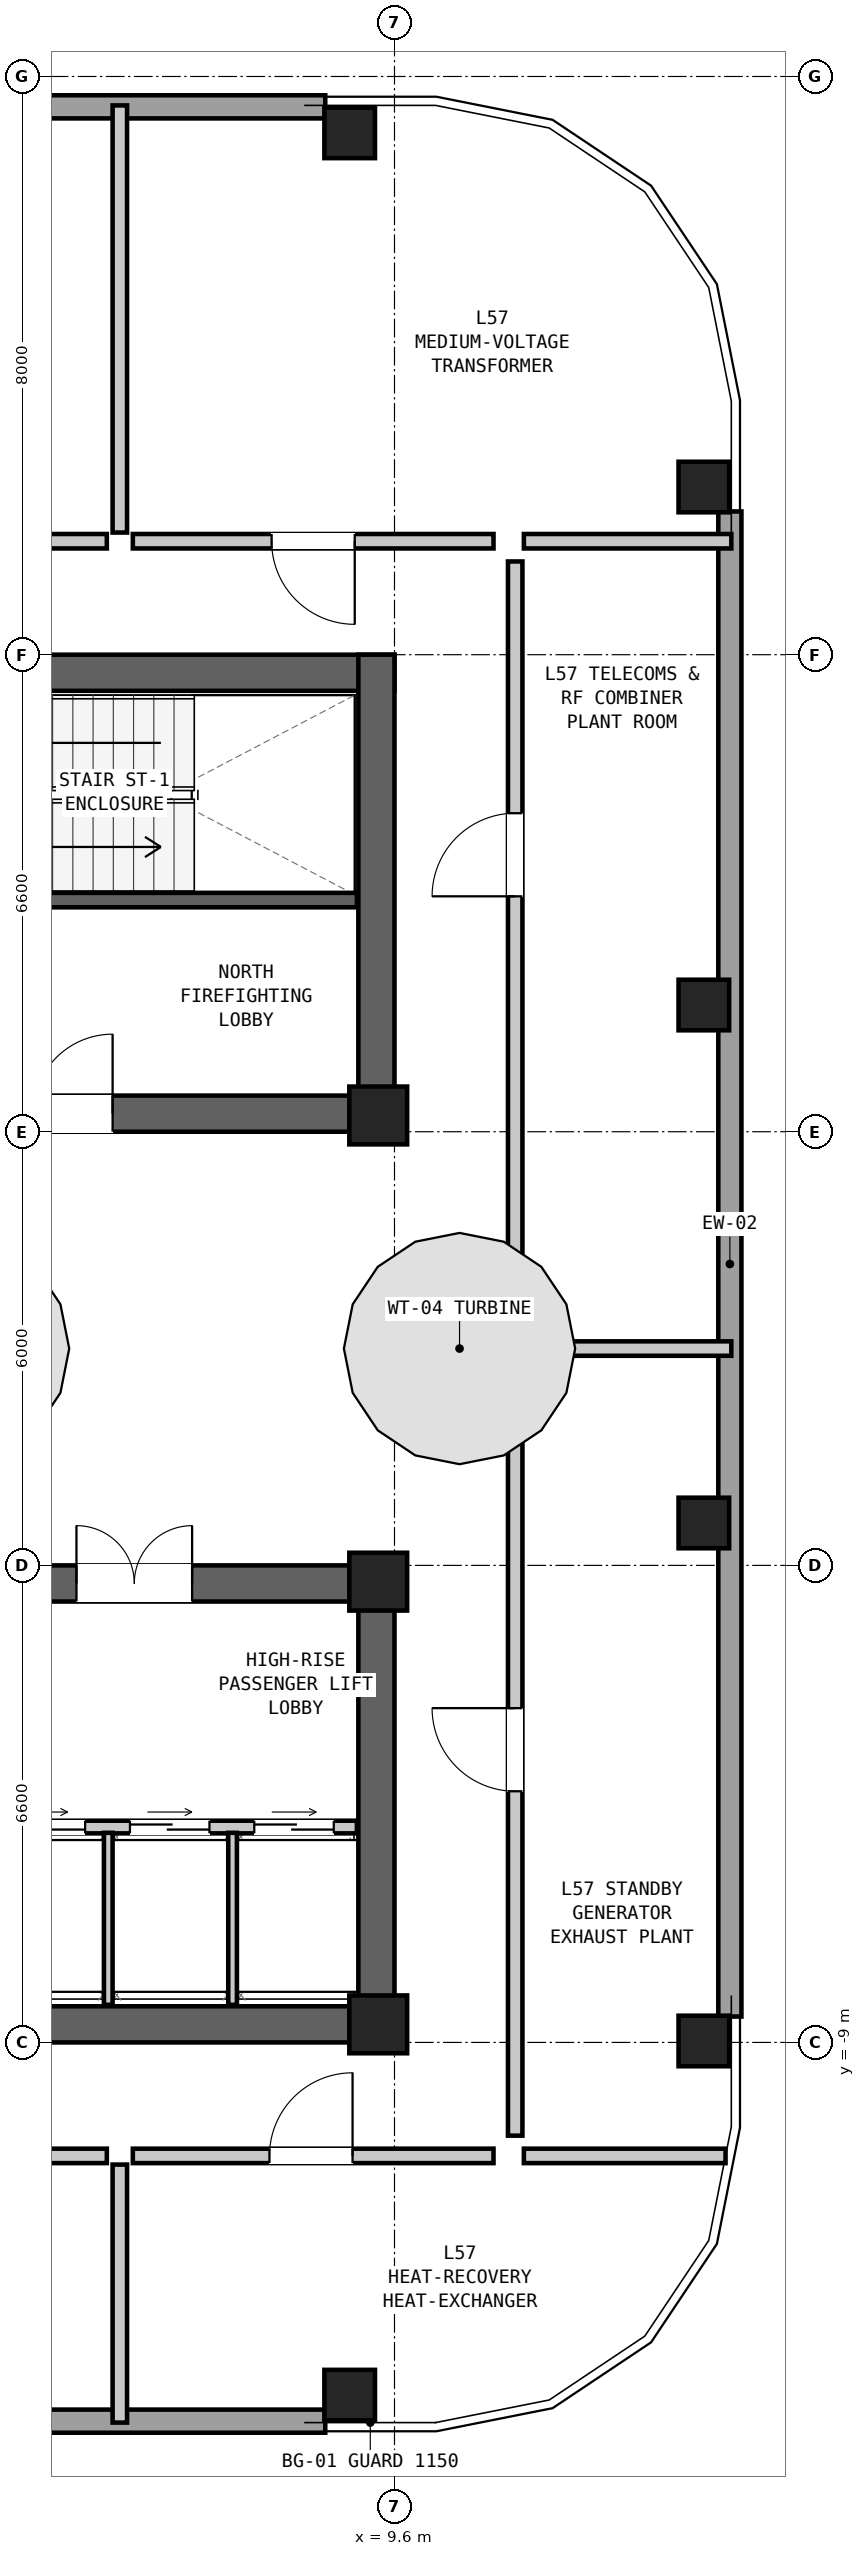
"""IFC4 building model, lengths in metres.
Left out: names, types, materials, properties, quantities, classifications, styles, units other than length and angle.
Written with IfcOpenShell. Run it as: python <this file> out.ifc"""

import sys

from ifc_helpers import new_model, si_unit, direction, frame, frame_2d, origin, origin_2d, place, context, subcontext, project, spatial, rectangle, hollow_rectangle, extrude, element, fill, save


model = new_model("IFC4")
c1 = context("Model", 3, precision=1e-05, world=origin(), true_north=direction((0.0, 1.0)))
c2 = subcontext(c1, "Body", "Model", "MODEL_VIEW")
j1 = project(units=[si_unit("LENGTHUNIT", "METRE"), si_unit("PLANEANGLEUNIT", "RADIAN")], contexts=[c1])
p1 = place(None, origin())
s1 = spatial("IfcSite", under=j1, at=p1, CompositionType="ELEMENT")
p2 = place(p1, origin())
s2 = spatial("IfcBuilding", under=s1, at=p2, CompositionType="ELEMENT")
p3 = place(p2, frame((0.0, 0.0, 195.15)))
s3 = spatial("IfcBuildingStorey", under=s2, at=p3, CompositionType="ELEMENT", Elevation=195.15)
p4 = place(p3, frame((-9.6, 9.95, 0.0), z_axis=(0.0, 0.0, 1.0), x_axis=(1.0, 0.0, 0.0)))
e1 = element("IfcWall", 1, at=p4, inside=s3, PredefinedType="SHEAR", context=c2, shape_type="SweptSolid", body=[
    extrude(rectangle(XDim=19.2, YDim=0.5, at=frame_2d((9.6, 0.0))), origin(), (0.0, 0.0, 1.0), 4.35),
])
p5 = place(p3, frame((-9.6, 3.85, 0.0), z_axis=(0.0, 0.0, 1.0), x_axis=(1.0, 0.0, 0.0)))
e2 = element("IfcWall", 2, at=p5, inside=s3, PredefinedType="SHEAR", context=c2, shape_type="SweptSolid", body=[
    extrude(rectangle(XDim=19.2, YDim=0.5, at=frame_2d((9.6, 0.0))), origin(), (0.0, 0.0, 1.0), 4.35),
])
p6 = place(p5, frame((14.2, 0.0, 0.0)))
e3 = element("IfcOpeningElement", 3, at=p6, cuts=e2, PredefinedType="OPENING", context=c2, shape_type="SweptSolid", body=[
    extrude(rectangle(XDim=1.1, YDim=2.08, at=frame_2d((0.55, 1.04))), frame((0.0, 0.262, 0.0), z_axis=(0.0, -1.0, 0.0), x_axis=(1.0, 0.0, 0.0)), (0.0, 0.0, 1.0), 0.524),
])
p7 = place(p5, frame((8.2, 0.0, 0.0)))
e4 = element("IfcOpeningElement", 4, at=p7, cuts=e2, PredefinedType="OPENING", context=c2, shape_type="SweptSolid", body=[
    extrude(rectangle(XDim=1.15, YDim=2.1, at=frame_2d((0.575, 1.05))), frame((0.0, 0.262, 0.0), z_axis=(0.0, -1.0, 0.0), x_axis=(1.0, 0.0, 0.0)), (0.0, 0.0, 1.0), 0.524),
])
p8 = place(p5, frame((2.5, 0.0, 0.0)))
e5 = element("IfcOpeningElement", 5, at=p8, cuts=e2, PredefinedType="OPENING", context=c2, shape_type="SweptSolid", body=[
    extrude(rectangle(XDim=1.6, YDim=2.12, at=frame_2d((0.8, 1.06))), frame((0.0, 0.262, 0.0), z_axis=(0.0, -1.0, 0.0), x_axis=(1.0, 0.0, 0.0)), (0.0, 0.0, 1.0), 0.524),
])
p9 = place(p3, frame((9.35, 3.6, 0.0), z_axis=(0.0, 0.0, 1.0), x_axis=(0.0, 1.0, 0.0)))
e6 = element("IfcWall", 6, at=p9, inside=s3, PredefinedType="SHEAR", context=c2, shape_type="SweptSolid", body=[
    extrude(rectangle(XDim=6.6, YDim=0.5, at=frame_2d((3.3, 0.0))), origin(), (0.0, 0.0, 1.0), 4.35),
])
p10 = place(p3, frame((-9.6, -8.75, 0.0), z_axis=(0.0, 0.0, 1.0), x_axis=(1.0, 0.0, 0.0)))
e7 = element("IfcWall", 7, at=p10, inside=s3, PredefinedType="SHEAR", context=c2, shape_type="SweptSolid", body=[
    extrude(rectangle(XDim=19.2, YDim=0.5, at=frame_2d((9.6, 0.0))), origin(), (0.0, 0.0, 1.0), 4.35),
])
p11 = place(p3, frame((-9.6, -2.65, 0.0), z_axis=(0.0, 0.0, 1.0), x_axis=(1.0, 0.0, 0.0)))
e8 = element("IfcWall", 8, at=p11, inside=s3, PredefinedType="SHEAR", context=c2, shape_type="SweptSolid", body=[
    extrude(rectangle(XDim=19.2, YDim=0.5, at=frame_2d((9.6, 0.0))), origin(), (0.0, 0.0, 1.0), 4.35),
])
p12 = place(p11, frame((3.8, 0.0, 0.0)))
e9 = element("IfcOpeningElement", 9, at=p12, cuts=e8, PredefinedType="OPENING", context=c2, shape_type="SweptSolid", body=[
    extrude(rectangle(XDim=1.1, YDim=2.08, at=frame_2d((0.55, 1.04))), frame((0.0, 0.262, 0.0), z_axis=(0.0, -1.0, 0.0), x_axis=(1.0, 0.0, 0.0)), (0.0, 0.0, 1.0), 0.524),
])
p13 = place(p11, frame((10.15, 0.0, 0.0)))
e10 = element("IfcOpeningElement", 10, at=p13, cuts=e8, PredefinedType="OPENING", context=c2, shape_type="SweptSolid", body=[
    extrude(rectangle(XDim=0.9, YDim=2.05, at=frame_2d((0.45, 1.025))), frame((0.0, 0.262, 0.0), z_axis=(0.0, -1.0, 0.0), x_axis=(1.0, 0.0, 0.0)), (0.0, 0.0, 1.0), 0.524),
])
p14 = place(p11, frame((12.1, 0.0, 0.0)))
e11 = element("IfcOpeningElement", 11, at=p14, cuts=e8, PredefinedType="OPENING", context=c2, shape_type="SweptSolid", body=[
    extrude(rectangle(XDim=0.95, YDim=2.1, at=frame_2d((0.475, 1.05))), frame((0.0, 0.262, 0.0), z_axis=(0.0, -1.0, 0.0), x_axis=(1.0, 0.0, 0.0)), (0.0, 0.0, 1.0), 0.524),
])
p15 = place(p11, frame((14.8, 0.0, 0.0)))
e12 = element("IfcOpeningElement", 12, at=p15, cuts=e8, PredefinedType="OPENING", context=c2, shape_type="SweptSolid", body=[
    extrude(rectangle(XDim=1.6, YDim=2.12, at=frame_2d((0.8, 1.06))), frame((0.0, 0.262, 0.0), z_axis=(0.0, -1.0, 0.0), x_axis=(1.0, 0.0, 0.0)), (0.0, 0.0, 1.0), 0.524),
])
p16 = place(p3, frame((9.35, -9.0, 0.0), z_axis=(0.0, 0.0, 1.0), x_axis=(0.0, 1.0, 0.0)))
e13 = element("IfcWall", 13, at=p16, inside=s3, PredefinedType="SHEAR", context=c2, shape_type="SweptSolid", body=[
    extrude(rectangle(XDim=6.6, YDim=0.5, at=frame_2d((3.3, 0.0))), origin(), (0.0, 0.0, 1.0), 4.35),
])
for number, where, z_axis, x_axis in (
    (14, (8.98, -13.88, 0.0), (0.0, 0.0, 1.0), (1.0, 0.0, 0.0)),
    (15, (13.88, -8.98, 0.0), (0.0, 0.0, 1.0), (0.0, 1.0, 0.0)),
    (16, (13.88, -1.813, 0.0), (0.0, 0.0, 1.0), (0.0, 1.0, 0.0)),
    (17, (13.88, 5.353, 0.0), (0.0, 0.0, 1.0), (0.0, 1.0, 0.0)),
    (18, (13.88, 12.52, 0.0), (0.0, 0.0, 1.0), (0.0, 1.0, 0.0)),
    (19, (8.98, 17.42, 0.0), (0.0, 0.0, 1.0), (1.0, 0.0, 0.0)),
):
    element("IfcColumn", number, at=place(p3, frame(where, z_axis=z_axis, x_axis=x_axis)), inside=s3, PredefinedType="COLUMN", context=c2, shape_type="SweptSolid", body=[
        extrude(hollow_rectangle(XDim=0.7, YDim=0.7, WallThickness=0.045, at=origin_2d()), origin(), (0.0, 0.0, 1.0), 4.35),
    ])
for number, where, z_axis, x_axis in (
    (20, (9.375, 3.825, 0.0), (0.0, 0.0, 1.0), (1.0, 0.0, 0.0)),
    (21, (9.375, -2.625, 0.0), (0.0, 0.0, 1.0), (1.0, 0.0, 0.0)),
    (22, (9.375, -8.75, 0.0), (0.0, 0.0, 1.0), (1.0, 0.0, 0.0)),
):
    element("IfcColumn", number, at=place(p3, frame(where, z_axis=z_axis, x_axis=x_axis)), inside=s3, PredefinedType="COLUMN", context=c2, shape_type="SweptSolid", body=[
        extrude(rectangle(XDim=0.8, YDim=0.8, at=origin_2d()), origin(), (0.0, 0.0, 1.0), 4.35),
    ])
for number, where, z_axis, x_axis in (
    (23, (8.642, -14.24, 0.0), (0.0, 0.0, 1.0), (-1.0, 0.0, 0.0)),
    (24, (14.24, 12.182, 0.0), (0.0, 0.0, 1.0), (0.0, -1.0, 0.0)),
    (25, (-12.182, 17.78, 0.0), (0.0, 0.0, 1.0), (1.0, 0.0, 0.0)),
):
    element("IfcWall", number, at=place(p3, frame(where, z_axis=z_axis, x_axis=x_axis)), inside=s3, PredefinedType="SOLIDWALL", context=c2, shape_type="SweptSolid", body=[
        extrude(rectangle(XDim=20.824, YDim=0.32, at=frame_2d((10.412, 0.0))), origin(), (0.0, 0.0, 1.0), 2.34),
    ])
p17 = place(p3, frame((2.36, 6.805, 0.0), z_axis=(0.0, 0.0, 1.0), x_axis=(1.0, 0.0, 0.0)))
e26 = element("IfcWall", 26, at=p17, inside=s3, PredefinedType="SHEAR", context=c2, shape_type="SweptSolid", body=[
    extrude(rectangle(XDim=6.72, YDim=0.2, at=frame_2d((3.36, 0.0))), origin(), (0.0, 0.0, 1.0), 4.16),
])
p18 = place(p17, frame((0.3, 0.0, 0.0)))
e27 = element("IfcOpeningElement", 27, at=p18, cuts=e26, PredefinedType="OPENING", context=c2, shape_type="SweptSolid", body=[
    extrude(rectangle(XDim=1.05, YDim=2.08, at=frame_2d((0.525, 1.04))), frame((0.0, 0.112, 0.0), z_axis=(0.0, -1.0, 0.0), x_axis=(1.0, 0.0, 0.0)), (0.0, 0.0, 1.0), 0.224),
])
p19 = place(p3, frame((4.0, -6.02, 0.0), z_axis=(0.0, 0.0, 1.0), x_axis=(1.0, 0.0, 0.0)))
e28 = element("IfcWall", 28, at=p19, inside=s3, PredefinedType="PARTITIONING", context=c2, shape_type="SweptSolid", body=[
    extrude(rectangle(XDim=5.08, YDim=0.175, at=frame_2d((2.54, 0.0))), origin(), (0.0, 0.0, 1.0), 4.16),
])
p20 = place(p19, frame((0.22, 0.0, 0.0)))
e29 = element("IfcOpeningElement", 29, at=p20, cuts=e28, PredefinedType="OPENING", context=c2, shape_type="SweptSolid", body=[
    extrude(rectangle(XDim=1.1, YDim=2.06, at=frame_2d((0.55, 1.03))), frame((0.0, 0.1, 0.0), z_axis=(0.0, -1.0, 0.0), x_axis=(1.0, 0.0, 0.0)), (0.0, 0.0, 1.0), 0.199),
])
p21 = place(p19, frame((1.94, 0.0, 0.0)))
e30 = element("IfcOpeningElement", 30, at=p21, cuts=e28, PredefinedType="OPENING", context=c2, shape_type="SweptSolid", body=[
    extrude(rectangle(XDim=1.1, YDim=2.06, at=frame_2d((0.55, 1.03))), frame((0.0, 0.1, 0.0), z_axis=(0.0, -1.0, 0.0), x_axis=(1.0, 0.0, 0.0)), (0.0, 0.0, 1.0), 0.199),
])
p22 = place(p19, frame((3.66, 0.0, 0.0)))
e31 = element("IfcOpeningElement", 31, at=p22, cuts=e28, PredefinedType="OPENING", context=c2, shape_type="SweptSolid", body=[
    extrude(rectangle(XDim=1.1, YDim=2.06, at=frame_2d((0.55, 1.03))), frame((0.0, 0.1, 0.0), z_axis=(0.0, -1.0, 0.0), x_axis=(1.0, 0.0, 0.0)), (0.0, 0.0, 1.0), 0.199),
])
for number, where, z_axis, x_axis in (
    (32, (5.64, -8.48, 0.0), (0.0, 0.0, 1.0), (0.0, 1.0, 0.0)),
    (33, (7.36, -8.48, 0.0), (0.0, 0.0, 1.0), (0.0, 1.0, 0.0)),
):
    element("IfcWall", number, at=place(p3, frame(where, z_axis=z_axis, x_axis=x_axis)), inside=s3, PredefinedType="PARTITIONING", context=c2, shape_type="SweptSolid", body=[
        extrude(rectangle(XDim=2.38, YDim=0.12, at=frame_2d((1.19, 0.0))), origin(), (0.0, 0.0, 1.0), 4.16),
    ])
p23 = place(p3, frame((5.62, 11.77, 0.0), z_axis=(0.0, 0.0, 1.0), x_axis=(-1.0, 0.0, 0.0)))
e34 = element("IfcWall", 34, at=p23, inside=s3, PredefinedType="PARTITIONING", context=c2, shape_type="SweptSolid", body=[
    extrude(rectangle(XDim=5.09, YDim=0.2, at=frame_2d((2.545, 0.0))), origin(), (0.0, 0.0, 1.0), 4.16),
])
p24 = place(p23, frame((1.97, 0.0, 0.0)))
e35 = element("IfcOpeningElement", 35, at=p24, cuts=e34, PredefinedType="OPENING", context=c2, shape_type="SweptSolid", body=[
    extrude(rectangle(XDim=1.15, YDim=2.1, at=frame_2d((0.575, 1.05))), frame((0.0, 0.112, 0.0), z_axis=(0.0, -1.0, 0.0), x_axis=(1.0, 0.0, 0.0)), (0.0, 0.0, 1.0), 0.224),
])
p25 = place(p3, frame((5.8, 11.89, 0.0), z_axis=(0.0, 0.0, 1.0), x_axis=(0.0, 1.0, 0.0)))
e36 = element("IfcWall", 36, at=p25, inside=s3, PredefinedType="PARTITIONING", context=c2, shape_type="SweptSolid", body=[
    extrude(rectangle(XDim=5.91, YDim=0.2, at=frame_2d((2.955, 0.0))), origin(), (0.0, 0.0, 1.0), 3.681),
])
p26 = place(p3, frame((10.97, 11.77, 0.0), z_axis=(0.0, 0.0, 1.0), x_axis=(-1.0, 0.0, 0.0)))
e37 = element("IfcWall", 37, at=p26, inside=s3, PredefinedType="PARTITIONING", context=c2, shape_type="SweptSolid", body=[
    extrude(rectangle(XDim=4.99, YDim=0.2, at=frame_2d((2.495, 0.0))), origin(), (0.0, 0.0, 1.0), 2.34),
])
p27 = place(p26, frame((1.92, 0.0, 0.0)))
e38 = element("IfcOpeningElement", 38, at=p27, cuts=e37, PredefinedType="OPENING", context=c2, shape_type="SweptSolid", body=[
    extrude(rectangle(XDim=1.15, YDim=2.1, at=frame_2d((0.575, 1.05))), frame((0.0, 0.112, 0.0), z_axis=(0.0, -1.0, 0.0), x_axis=(1.0, 0.0, 0.0)), (0.0, 0.0, 1.0), 0.224),
])
p28 = place(p3, frame((0.53, -10.57, 0.0), z_axis=(0.0, 0.0, 1.0), x_axis=(1.0, 0.0, 0.0)))
e39 = element("IfcWall", 39, at=p28, inside=s3, PredefinedType="PARTITIONING", context=c2, shape_type="SweptSolid", body=[
    extrude(rectangle(XDim=5.09, YDim=0.2, at=frame_2d((2.545, 0.0))), origin(), (0.0, 0.0, 1.0), 4.16),
])
p29 = place(p28, frame((1.97, 0.0, 0.0)))
e40 = element("IfcOpeningElement", 40, at=p29, cuts=e39, PredefinedType="OPENING", context=c2, shape_type="SweptSolid", body=[
    extrude(rectangle(XDim=1.15, YDim=2.1, at=frame_2d((0.575, 1.05))), frame((0.0, 0.112, 0.0), z_axis=(0.0, -1.0, 0.0), x_axis=(1.0, 0.0, 0.0)), (0.0, 0.0, 1.0), 0.224),
])
p30 = place(p3, frame((5.8, -14.26, 0.0), z_axis=(0.0, 0.0, 1.0), x_axis=(0.0, 1.0, 0.0)))
e41 = element("IfcWall", 41, at=p30, inside=s3, PredefinedType="PARTITIONING", context=c2, shape_type="SweptSolid", body=[
    extrude(rectangle(XDim=3.57, YDim=0.2, at=frame_2d((1.785, 0.0))), origin(), (0.0, 0.0, 1.0), 3.681),
])
p31 = place(p3, frame((5.98, -10.57, 0.0), z_axis=(0.0, 0.0, 1.0), x_axis=(1.0, 0.0, 0.0)))
e42 = element("IfcWall", 42, at=p31, inside=s3, PredefinedType="PARTITIONING", context=c2, shape_type="SweptSolid", body=[
    extrude(rectangle(XDim=4.99, YDim=0.2, at=frame_2d((2.495, 0.0))), origin(), (0.0, 0.0, 1.0), 4.16),
])
p32 = place(p31, frame((1.89, 0.0, 0.0)))
e43 = element("IfcOpeningElement", 43, at=p32, cuts=e42, PredefinedType="OPENING", context=c2, shape_type="SweptSolid", body=[
    extrude(rectangle(XDim=1.15, YDim=2.1, at=frame_2d((0.575, 1.05))), frame((0.0, 0.112, 0.0), z_axis=(0.0, -1.0, 0.0), x_axis=(1.0, 0.0, 0.0)), (0.0, 0.0, 1.0), 0.224),
])
p33 = place(p3, frame((11.39, 11.77, 0.0), z_axis=(0.0, 0.0, 1.0), x_axis=(1.0, 0.0, 0.0)))
e44 = element("IfcWall", 44, at=p33, inside=s3, PredefinedType="PARTITIONING", context=c2, shape_type="SweptSolid", body=[
    extrude(rectangle(XDim=2.87, YDim=0.2, at=frame_2d((1.435, 0.0))), origin(), (0.0, 0.0, 1.0), 2.34),
])
p34 = place(p3, frame((11.39, -10.57, 0.0), z_axis=(0.0, 0.0, 1.0), x_axis=(1.0, 0.0, 0.0)))
e45 = element("IfcWall", 45, at=p34, inside=s3, PredefinedType="PARTITIONING", context=c2, shape_type="SweptSolid", body=[
    extrude(rectangle(XDim=2.79, YDim=0.2, at=frame_2d((1.395, 0.0))), origin(), (0.0, 0.0, 1.0), 4.16),
])
p35 = place(p3, frame((11.39, 0.6, 0.0), z_axis=(0.0, 0.0, 1.0), x_axis=(1.0, 0.0, 0.0)))
e46 = element("IfcWall", 46, at=p35, inside=s3, PredefinedType="PARTITIONING", context=c2, shape_type="SweptSolid", body=[
    extrude(rectangle(XDim=2.87, YDim=0.2, at=frame_2d((1.435, 0.0))), origin(), (0.0, 0.0, 1.0), 2.34),
])
p36 = place(p3, frame((11.27, -10.29, 0.0), z_axis=(0.0, 0.0, 1.0), x_axis=(0.0, 1.0, 0.0)))
e47 = element("IfcWall", 47, at=p36, inside=s3, PredefinedType="PARTITIONING", context=c2, shape_type="SweptSolid", body=[
    extrude(rectangle(XDim=10.68, YDim=0.2, at=frame_2d((5.34, 0.0))), origin(), (0.0, 0.0, 1.0), 4.16),
])
p37 = place(p36, frame((4.765, 0.0, 0.0)))
e48 = element("IfcOpeningElement", 48, at=p37, cuts=e47, PredefinedType="OPENING", context=c2, shape_type="SweptSolid", body=[
    extrude(rectangle(XDim=1.15, YDim=2.1, at=frame_2d((0.575, 1.05))), frame((0.0, 0.112, 0.0), z_axis=(0.0, -1.0, 0.0), x_axis=(1.0, 0.0, 0.0)), (0.0, 0.0, 1.0), 0.224),
])
p38 = place(p3, frame((11.27, 0.81, 0.0), z_axis=(0.0, 0.0, 1.0), x_axis=(0.0, 1.0, 0.0)))
e49 = element("IfcWall", 49, at=p38, inside=s3, PredefinedType="PARTITIONING", context=c2, shape_type="SweptSolid", body=[
    extrude(rectangle(XDim=10.68, YDim=0.2, at=frame_2d((5.34, 0.0))), origin(), (0.0, 0.0, 1.0), 4.16),
])
p39 = place(p38, frame((6.047, 0.0, 0.0)))
e50 = element("IfcOpeningElement", 50, at=p39, cuts=e49, PredefinedType="OPENING", context=c2, shape_type="SweptSolid", body=[
    extrude(rectangle(XDim=1.15, YDim=2.1, at=frame_2d((0.575, 1.05))), frame((0.0, 0.112, 0.0), z_axis=(0.0, -1.0, 0.0), x_axis=(1.0, 0.0, 0.0)), (0.0, 0.0, 1.0), 0.224),
])
p40 = place(p6, origin())
e51 = element("IfcDoor", 51, at=p40, inside=s3, OperationType="SINGLE_SWING_RIGHT", PredefinedType="DOOR", context=c2, shape_type="SweptSolid", body=[
    extrude(rectangle(XDim=1.1, YDim=2.08, at=frame_2d((0.55, 1.04))), frame((0.0, 0.025, 0.0), z_axis=(0.0, -1.0, 0.0), x_axis=(1.0, 0.0, 0.0)), (0.0, 0.0, 1.0), 0.05),
])
fill(e3, e51)
p41 = place(p20, origin())
e52 = element("IfcDoor", 52, at=p41, inside=s3, OperationType="DOUBLE_DOOR_SLIDING", PredefinedType="DOOR", context=c2, shape_type="SweptSolid", body=[
    extrude(rectangle(XDim=1.1, YDim=2.06, at=frame_2d((0.55, 1.03))), frame((0.0, 0.025, 0.0), z_axis=(0.0, -1.0, 0.0), x_axis=(1.0, 0.0, 0.0)), (0.0, 0.0, 1.0), 0.05),
])
fill(e29, e52)
p42 = place(p21, origin())
e53 = element("IfcDoor", 53, at=p42, inside=s3, OperationType="DOUBLE_DOOR_SLIDING", PredefinedType="DOOR", context=c2, shape_type="SweptSolid", body=[
    extrude(rectangle(XDim=1.1, YDim=2.06, at=frame_2d((0.55, 1.03))), frame((0.0, 0.025, 0.0), z_axis=(0.0, -1.0, 0.0), x_axis=(1.0, 0.0, 0.0)), (0.0, 0.0, 1.0), 0.05),
])
fill(e30, e53)
p43 = place(p22, origin())
e54 = element("IfcDoor", 54, at=p43, inside=s3, OperationType="DOUBLE_DOOR_SLIDING", PredefinedType="DOOR", context=c2, shape_type="SweptSolid", body=[
    extrude(rectangle(XDim=1.1, YDim=2.06, at=frame_2d((0.55, 1.03))), frame((0.0, 0.025, 0.0), z_axis=(0.0, -1.0, 0.0), x_axis=(1.0, 0.0, 0.0)), (0.0, 0.0, 1.0), 0.05),
])
fill(e31, e54)
p44 = place(p15, origin())
e55 = element("IfcDoor", 55, at=p44, inside=s3, OperationType="DOUBLE_DOOR_SINGLE_SWING", PredefinedType="DOOR", context=c2, shape_type="SweptSolid", body=[
    extrude(rectangle(XDim=1.6, YDim=2.12, at=frame_2d((0.8, 1.06))), frame((0.0, 0.025, 0.0), z_axis=(0.0, -1.0, 0.0), x_axis=(1.0, 0.0, 0.0)), (0.0, 0.0, 1.0), 0.05),
])
fill(e12, e55)
p45 = place(p27, origin())
e56 = element("IfcDoor", 56, at=p45, inside=s3, OperationType="SINGLE_SWING_LEFT", PredefinedType="DOOR", context=c2, shape_type="SweptSolid", body=[
    extrude(rectangle(XDim=1.15, YDim=2.1, at=frame_2d((0.575, 1.05))), frame((0.0, 0.025, 0.0), z_axis=(0.0, -1.0, 0.0), x_axis=(1.0, 0.0, 0.0)), (0.0, 0.0, 1.0), 0.05),
])
fill(e38, e56)
p46 = place(p32, origin())
e57 = element("IfcDoor", 57, at=p46, inside=s3, OperationType="SINGLE_SWING_RIGHT", PredefinedType="DOOR", context=c2, shape_type="SweptSolid", body=[
    extrude(rectangle(XDim=1.15, YDim=2.1, at=frame_2d((0.575, 1.05))), frame((0.0, 0.025, 0.0), z_axis=(0.0, -1.0, 0.0), x_axis=(1.0, 0.0, 0.0)), (0.0, 0.0, 1.0), 0.05),
])
fill(e43, e57)
p47 = place(p37, origin())
e58 = element("IfcDoor", 58, at=p47, inside=s3, OperationType="SINGLE_SWING_RIGHT", PredefinedType="DOOR", context=c2, shape_type="SweptSolid", body=[
    extrude(rectangle(XDim=1.15, YDim=2.1, at=frame_2d((0.575, 1.05))), frame((0.0, 0.025, 0.0), z_axis=(0.0, -1.0, 0.0), x_axis=(1.0, 0.0, 0.0)), (0.0, 0.0, 1.0), 0.05),
])
fill(e48, e58)
p48 = place(p39, origin())
e59 = element("IfcDoor", 59, at=p48, inside=s3, OperationType="SINGLE_SWING_LEFT", PredefinedType="DOOR", context=c2, shape_type="SweptSolid", body=[
    extrude(rectangle(XDim=1.15, YDim=2.1, at=frame_2d((0.575, 1.05))), frame((0.0, 0.025, 0.0), z_axis=(0.0, -1.0, 0.0), x_axis=(1.0, 0.0, 0.0)), (0.0, 0.0, 1.0), 0.05),
])
fill(e50, e59)
save(model, sys.argv[1])
